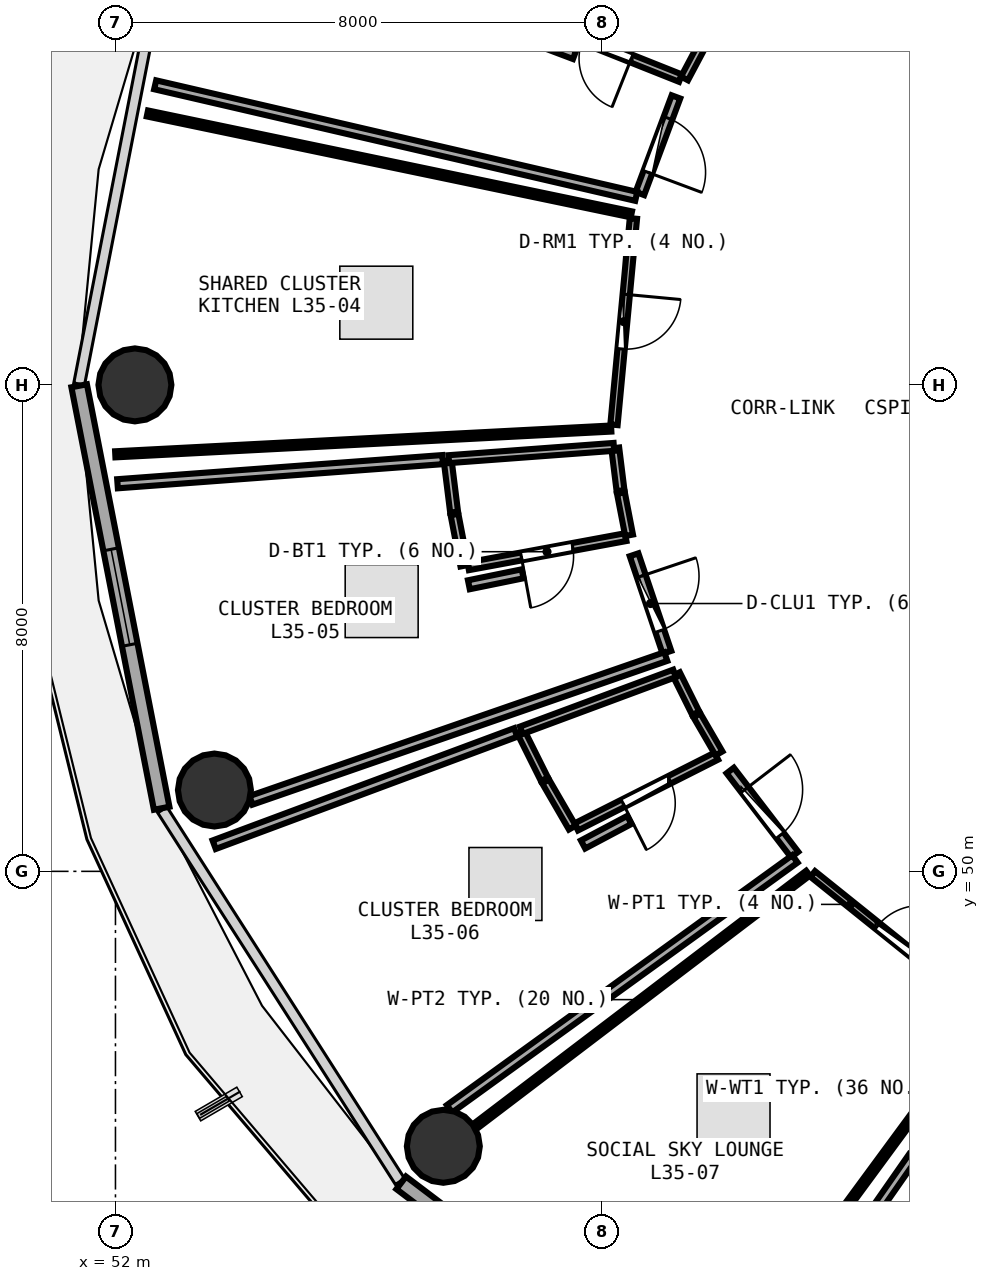
"""IFC4 building model, lengths in metres.
Left out: names, types, materials, properties, quantities, classifications, styles, units other than length and angle.
Written with IfcOpenShell. Run it as: python <this file> out.ifc"""

import sys

from ifc_helpers import new_model, si_unit, direction, frame, frame_2d, origin, origin_2d, place, context, subcontext, project, spatial, rectangle, circle, extrude, element, fill, save


model = new_model("IFC4")
c1 = context("Model", 3, precision=1e-05, world=origin(), true_north=direction((0.0, 1.0)))
c2 = subcontext(c1, "Body", "Model", "MODEL_VIEW")
j1 = project(units=[si_unit("LENGTHUNIT", "METRE"), si_unit("PLANEANGLEUNIT", "RADIAN")], contexts=[c1])
p1 = place(None, origin())
s1 = spatial("IfcSite", under=j1, at=p1, CompositionType="ELEMENT")
p2 = place(p1, origin())
s2 = spatial("IfcBuilding", under=s1, at=p2, CompositionType="ELEMENT")
p3 = place(p2, frame((0.0, 0.0, 139.35)))
s3 = spatial("IfcBuildingStorey", under=s2, at=p3, CompositionType="ELEMENT", Elevation=139.35)
for number, where, z_axis, x_axis in (
    (1, (52.32, 58.0, 0.0), (0.0, 0.0, 1.0), (1.0, 0.0, 0.0)),
    (2, (53.627, 51.337, 0.0), (0.0, 0.0, 1.0), (1.0, 0.0, 0.0)),
    (3, (57.392, 45.479, 0.0), (0.0, 0.0, 1.0), (1.0, 0.0, 0.0)),
):
    element("IfcColumn", number, at=place(p3, frame(where, z_axis=z_axis, x_axis=x_axis)), inside=s3, PredefinedType="COLUMN", context=c2, shape_type="SweptSolid", body=[
        extrude(circle(Radius=0.6, at=origin_2d()), origin(), (0.0, 0.0, 1.0), 3.75),
    ])
p4 = place(p3, frame((51.403, 57.985, 0.0), z_axis=(0.0, 0.0, 1.0), x_axis=(0.191716984769, -0.981450252306, 0.0)))
e4 = element("IfcWall", 4, at=p4, inside=s3, PredefinedType="SOLIDWALL", context=c2, shape_type="SweptSolid", body=[
    extrude(rectangle(XDim=7.079, YDim=0.26, at=frame_2d((3.54, 0.0))), origin(), (0.0, 0.0, 1.0), 3.475),
])
p5 = place(p4, frame((2.74, 0.0, 0.85)))
e5 = element("IfcOpeningElement", 5, at=p5, cuts=e4, PredefinedType="OPENING", context=c2, shape_type="SweptSolid", body=[
    extrude(rectangle(XDim=1.6, YDim=1.45, at=frame_2d((0.8, 0.725))), frame((0.0, 0.14, 0.0), z_axis=(0.0, -1.0, 0.0), x_axis=(1.0, 0.0, 0.0)), (0.0, 0.0, 1.0), 0.28),
])
p6 = place(p3, frame((56.699, 44.878, 0.0), z_axis=(0.0, 0.0, 1.0), x_axis=(0.797163719609, -0.603763202042, 0.0)))
e6 = element("IfcWall", 6, at=p6, inside=s3, PredefinedType="SOLIDWALL", context=c2, shape_type="SweptSolid", body=[
    extrude(rectangle(XDim=7.512, YDim=0.26, at=frame_2d((3.756, 0.0))), origin(), (0.0, 0.0, 1.0), 3.475),
])
p7 = place(p6, frame((2.956, 0.0, 0.85)))
e7 = element("IfcOpeningElement", 7, at=p7, cuts=e6, PredefinedType="OPENING", context=c2, shape_type="SweptSolid", body=[
    extrude(rectangle(XDim=1.6, YDim=1.45, at=frame_2d((0.8, 0.725))), frame((0.0, 0.14, 0.0), z_axis=(0.0, -1.0, 0.0), x_axis=(1.0, 0.0, 0.0)), (0.0, 0.0, 1.0), 0.28),
])
p8 = place(p3, frame((61.293, 63.044, 0.0), z_axis=(0.0, 0.0, 1.0), x_axis=(-0.929051463741, 0.369950507123, 0.0)))
e8 = element("IfcWall", 8, at=p8, inside=s3, PredefinedType="PLUMBINGWALL", context=c2, shape_type="SweptSolid", body=[
    extrude(rectangle(XDim=2.602, YDim=0.13, at=frame_2d((1.301, 0.0))), origin(), (0.0, 0.0, 1.0), 3.235),
])
p9 = place(p8, frame((0.871, 0.0, 0.0)))
e9 = element("IfcOpeningElement", 9, at=p9, cuts=e8, PredefinedType="OPENING", context=c2, shape_type="SweptSolid", body=[
    extrude(rectangle(XDim=0.86, YDim=2.05, at=frame_2d((0.43, 1.025))), frame((0.0, 0.075, 0.0), z_axis=(0.0, -1.0, 0.0), x_axis=(1.0, 0.0, 0.0)), (0.0, 0.0, 1.0), 0.15),
])
p10 = place(p3, frame((61.218, 62.736, 0.0), z_axis=(0.0, 0.0, 1.0), x_axis=(-0.349718783302, -0.93685472332, 0.0)))
e10 = element("IfcWall", 10, at=p10, inside=s3, PredefinedType="PARTITIONING", context=c2, shape_type="SweptSolid", body=[
    extrude(rectangle(XDim=1.696, YDim=0.15, at=frame_2d((0.848, 0.0))), origin(), (0.0, 0.0, 1.0), 3.235),
])
p11 = place(p10, frame((0.373, 0.0, 0.0)))
e11 = element("IfcOpeningElement", 11, at=p11, cuts=e10, PredefinedType="OPENING", context=c2, shape_type="SweptSolid", body=[
    extrude(rectangle(XDim=0.95, YDim=2.08, at=frame_2d((0.475, 1.04))), frame((0.0, 0.085, 0.0), z_axis=(0.0, -1.0, 0.0), x_axis=(1.0, 0.0, 0.0)), (0.0, 0.0, 1.0), 0.17),
])
p12 = place(p3, frame((60.518, 60.736, 0.0), z_axis=(0.0, 0.0, 1.0), x_axis=(-0.093855600535, -0.995585820634, 0.0)))
e12 = element("IfcWall", 12, at=p12, inside=s3, PredefinedType="PARTITIONING", context=c2, shape_type="SweptSolid", body=[
    extrude(rectangle(XDim=3.408, YDim=0.12, at=frame_2d((1.704, 0.0))), origin(), (0.0, 0.0, 1.0), 2.975),
])
p13 = place(p12, frame((1.254, 0.0, 0.0)))
e13 = element("IfcOpeningElement", 13, at=p13, cuts=e12, PredefinedType="OPENING", context=c2, shape_type="SweptSolid", body=[
    extrude(rectangle(XDim=0.9, YDim=2.08, at=frame_2d((0.45, 1.04))), frame((0.0, 0.07, 0.0), z_axis=(0.0, -1.0, 0.0), x_axis=(1.0, 0.0, 0.0)), (0.0, 0.0, 1.0), 0.14),
])
p14 = place(p3, frame((60.392, 55.496, 0.0), z_axis=(0.0, 0.0, 1.0), x_axis=(-0.983321304086, -0.181876916981, 0.0)))
e14 = element("IfcWall", 14, at=p14, inside=s3, PredefinedType="PLUMBINGWALL", context=c2, shape_type="SweptSolid", body=[
    extrude(rectangle(XDim=2.635, YDim=0.13, at=frame_2d((1.317, 0.0))), origin(), (0.0, 0.0, 1.0), 3.175),
])
p15 = place(p14, frame((0.887, 0.0, 0.0)))
e15 = element("IfcOpeningElement", 15, at=p15, cuts=e14, PredefinedType="OPENING", context=c2, shape_type="SweptSolid", body=[
    extrude(rectangle(XDim=0.86, YDim=2.05, at=frame_2d((0.43, 1.025))), frame((0.0, 0.075, 0.0), z_axis=(0.0, -1.0, 0.0), x_axis=(1.0, 0.0, 0.0)), (0.0, 0.0, 1.0), 0.15),
])
p16 = place(p3, frame((60.529, 55.206, 0.0), z_axis=(0.0, 0.0, 1.0), x_axis=(0.319297944841, -0.947654379202, 0.0)))
e16 = element("IfcWall", 16, at=p16, inside=s3, PredefinedType="PARTITIONING", context=c2, shape_type="SweptSolid", body=[
    extrude(rectangle(XDim=1.693, YDim=0.15, at=frame_2d((0.846, 0.0))), origin(), (0.0, 0.0, 1.0), 3.235),
])
p17 = place(p16, frame((0.371, 0.0, 0.0)))
e17 = element("IfcOpeningElement", 17, at=p17, cuts=e16, PredefinedType="OPENING", context=c2, shape_type="SweptSolid", body=[
    extrude(rectangle(XDim=0.95, YDim=2.08, at=frame_2d((0.475, 1.04))), frame((0.0, 0.085, 0.0), z_axis=(0.0, -1.0, 0.0), x_axis=(1.0, 0.0, 0.0)), (0.0, 0.0, 1.0), 0.17),
])
p18 = place(p3, frame((61.883, 51.895, 0.0), z_axis=(0.0, 0.0, 1.0), x_axis=(-0.892490597906, -0.451065995891, 0.0)))
e18 = element("IfcWall", 18, at=p18, inside=s3, PredefinedType="PLUMBINGWALL", context=c2, shape_type="SweptSolid", body=[
    extrude(rectangle(XDim=2.583, YDim=0.13, at=frame_2d((1.292, 0.0))), origin(), (0.0, 0.0, 1.0), 2.975),
])
p19 = place(p18, frame((0.861, 0.0, 0.0)))
e19 = element("IfcOpeningElement", 19, at=p19, cuts=e18, PredefinedType="OPENING", context=c2, shape_type="SweptSolid", body=[
    extrude(rectangle(XDim=0.86, YDim=2.05, at=frame_2d((0.43, 1.025))), frame((0.0, 0.075, 0.0), z_axis=(0.0, -1.0, 0.0), x_axis=(1.0, 0.0, 0.0)), (0.0, 0.0, 1.0), 0.15),
])
p20 = place(p3, frame((62.111, 51.658, 0.0), z_axis=(0.0, 0.0, 1.0), x_axis=(0.608307977949, -0.793701079729, 0.0)))
e20 = element("IfcWall", 20, at=p20, inside=s3, PredefinedType="PARTITIONING", context=c2, shape_type="SweptSolid", body=[
    extrude(rectangle(XDim=1.742, YDim=0.15, at=frame_2d((0.871, 0.0))), origin(), (0.0, 0.0, 1.0), 2.975),
])
p21 = place(p20, frame((0.396, 0.0, 0.0)))
e21 = element("IfcOpeningElement", 21, at=p21, cuts=e20, PredefinedType="OPENING", context=c2, shape_type="SweptSolid", body=[
    extrude(rectangle(XDim=0.95, YDim=2.08, at=frame_2d((0.475, 1.04))), frame((0.0, 0.085, 0.0), z_axis=(0.0, -1.0, 0.0), x_axis=(1.0, 0.0, 0.0)), (0.0, 0.0, 1.0), 0.17),
])
p22 = place(p3, frame((63.468, 49.957, 0.0), z_axis=(0.0, 0.0, 1.0), x_axis=(0.78006790059, -0.625694870099, 0.0)))
e22 = element("IfcWall", 22, at=p22, inside=s3, PredefinedType="PARTITIONING", context=c2, shape_type="SweptSolid", body=[
    extrude(rectangle(XDim=3.631, YDim=0.12, at=frame_2d((1.815, 0.0))), origin(), (0.0, 0.0, 1.0), 2.975),
])
p23 = place(p22, frame((1.366, 0.0, 0.0)))
e23 = element("IfcOpeningElement", 23, at=p23, cuts=e22, PredefinedType="OPENING", context=c2, shape_type="SweptSolid", body=[
    extrude(rectangle(XDim=0.9, YDim=2.08, at=frame_2d((0.45, 1.04))), frame((0.0, 0.07, 0.0), z_axis=(0.0, -1.0, 0.0), x_axis=(1.0, 0.0, 0.0)), (0.0, 0.0, 1.0), 0.14),
])
p24 = place(p3, frame((61.697, 63.676, 0.0), z_axis=(0.0, 0.0, 1.0), x_axis=(-0.469163481751, -0.88311133352, 0.0)))
e24 = element("IfcWall", 24, at=p24, inside=s3, PredefinedType="PLUMBINGWALL", context=c2, shape_type="SweptSolid", body=[
    extrude(rectangle(XDim=0.721, YDim=0.13, at=frame_2d((0.36, 0.0))), origin(), (0.0, 0.0, 1.0), 3.48),
])
p25 = place(p3, frame((60.565, 61.1, 0.0), z_axis=(0.0, 0.0, 1.0), x_axis=(-0.97414388338, 0.225928516292, 0.0)))
e25 = element("IfcWall", 25, at=p25, inside=s3, PredefinedType="PARTITIONING", context=c2, shape_type="SweptSolid", body=[
    extrude(rectangle(XDim=8.122, YDim=0.15, at=frame_2d((4.061, 0.0))), origin(), (0.0, 0.0, 1.0), 3.025),
])
p26 = place(p3, frame((58.688, 63.755, 0.0), z_axis=(0.0, 0.0, 1.0), x_axis=(0.935532386314, -0.353240929336, 0.0)))
e26 = element("IfcWall", 26, at=p26, inside=s3, PredefinedType="PARTITIONING", context=c2, shape_type="SweptSolid", body=[
    extrude(rectangle(XDim=0.922, YDim=0.15, at=frame_2d((0.461, 0.0))), origin(), (0.0, 0.0, 1.0), 3.48),
])
p27 = place(p3, frame((60.153, 57.282, 0.0), z_axis=(0.0, 0.0, 1.0), x_axis=(-0.998652620107, -0.051893586821, 0.0)))
e27 = element("IfcWall", 27, at=p27, inside=s3, PredefinedType="PARTITIONING", context=c2, shape_type="SweptSolid", body=[
    extrude(rectangle(XDim=8.167, YDim=0.1, at=frame_2d((4.083, 0.0))), origin(), (0.0, 0.0, 1.0), 3.025),
])
p28 = place(p3, frame((52.525, 62.464, 0.0), z_axis=(0.0, 0.0, 1.0), x_axis=(0.978946183013, -0.204118521367, 0.0)))
e28 = element("IfcWall", 28, at=p28, inside=s3, PredefinedType="PARTITIONING", context=c2, shape_type="SweptSolid", body=[
    extrude(rectangle(XDim=8.131, YDim=0.1, at=frame_2d((4.065, 0.0))), origin(), (0.0, 0.0, 1.0), 3.025),
])
p29 = place(p3, frame((60.219, 56.962, 0.0), z_axis=(0.0, 0.0, 1.0), x_axis=(0.12297181285, -0.992410163816, 0.0)))
e29 = element("IfcWall", 29, at=p29, inside=s3, PredefinedType="PLUMBINGWALL", context=c2, shape_type="SweptSolid", body=[
    extrude(rectangle(XDim=0.707, YDim=0.13, at=frame_2d((0.354, 0.0))), origin(), (0.0, 0.0, 1.0), 3.48),
])
p30 = place(p3, frame((60.313, 56.221, 0.0), z_axis=(0.0, 0.0, 1.0), x_axis=(0.190075536698, -0.981769469045, 0.0)))
e30 = element("IfcWall", 30, at=p30, inside=s3, PredefinedType="PLUMBINGWALL", context=c2, shape_type="SweptSolid", body=[
    extrude(rectangle(XDim=0.708, YDim=0.13, at=frame_2d((0.354, 0.0))), origin(), (0.0, 0.0, 1.0), 3.48),
])
p31 = place(p3, frame((57.738, 55.026, 0.0), z_axis=(0.0, 0.0, 1.0), x_axis=(-0.189438154161, 0.981892654901, 0.0)))
e31 = element("IfcWall", 31, at=p31, inside=s3, PredefinedType="PLUMBINGWALL", context=c2, shape_type="SweptSolid", body=[
    extrude(rectangle(XDim=0.858, YDim=0.13, at=frame_2d((0.429, 0.0))), origin(), (0.0, 0.0, 1.0), 3.48),
])
p32 = place(p3, frame((57.57, 55.908, 0.0), z_axis=(0.0, 0.0, 1.0), x_axis=(-0.124069838268, 0.992273488123, 0.0)))
e32 = element("IfcWall", 32, at=p32, inside=s3, PredefinedType="PLUMBINGWALL", context=c2, shape_type="SweptSolid", body=[
    extrude(rectangle(XDim=0.856, YDim=0.13, at=frame_2d((0.428, 0.0))), origin(), (0.0, 0.0, 1.0), 3.48),
])
p33 = place(p3, frame((57.481, 56.779, 0.0), z_axis=(0.0, 0.0, 1.0), x_axis=(0.997248398148, 0.074132532608, 0.0)))
e33 = element("IfcWall", 33, at=p33, inside=s3, PredefinedType="PLUMBINGWALL", context=c2, shape_type="SweptSolid", body=[
    extrude(rectangle(XDim=2.724, YDim=0.13, at=frame_2d((1.362, 0.0))), origin(), (0.0, 0.0, 1.0), 3.175),
])
p34 = place(p3, frame((61.051, 53.532, 0.0), z_axis=(0.0, 0.0, 1.0), x_axis=(-0.944870237137, -0.327445010608, 0.0)))
e34 = element("IfcWall", 34, at=p34, inside=s3, PredefinedType="PARTITIONING", context=c2, shape_type="SweptSolid", body=[
    extrude(rectangle(XDim=7.22, YDim=0.15, at=frame_2d((3.61, 0.0))), origin(), (0.0, 0.0, 1.0), 2.975),
])
p35 = place(p3, frame((52.034, 56.374, 0.0), z_axis=(0.0, 0.0, 1.0), x_axis=(0.997255565749, 0.074036049215, 0.0)))
e35 = element("IfcWall", 35, at=p35, inside=s3, PredefinedType="PARTITIONING", context=c2, shape_type="SweptSolid", body=[
    extrude(rectangle(XDim=5.362, YDim=0.15, at=frame_2d((2.681, 0.0))), origin(), (0.0, 0.0, 1.0), 3.025),
])
p36 = place(p3, frame((57.812, 54.713, 0.0), z_axis=(0.0, 0.0, 1.0), x_axis=(0.979802976843, 0.199965313418, 0.0)))
e36 = element("IfcWall", 36, at=p36, inside=s3, PredefinedType="PARTITIONING", context=c2, shape_type="SweptSolid", body=[
    extrude(rectangle(XDim=0.902, YDim=0.15, at=frame_2d((0.451, 0.0))), origin(), (0.0, 0.0, 1.0), 3.175),
])
p37 = place(p3, frame((61.223, 53.245, 0.0), z_axis=(0.0, 0.0, 1.0), x_axis=(0.445176568549, -0.895442808232, 0.0)))
e37 = element("IfcWall", 37, at=p37, inside=s3, PredefinedType="PLUMBINGWALL", context=c2, shape_type="SweptSolid", body=[
    extrude(rectangle(XDim=0.719, YDim=0.13, at=frame_2d((0.36, 0.0))), origin(), (0.0, 0.0, 1.0), 3.235),
])
p38 = place(p3, frame((61.562, 52.566, 0.0), z_axis=(0.0, 0.0, 1.0), x_axis=(0.502403748171, -0.864633144069, 0.0)))
e38 = element("IfcWall", 38, at=p38, inside=s3, PredefinedType="PLUMBINGWALL", context=c2, shape_type="SweptSolid", body=[
    extrude(rectangle(XDim=0.725, YDim=0.13, at=frame_2d((0.362, 0.0))), origin(), (0.0, 0.0, 1.0), 3.48),
])
p39 = place(p3, frame((59.514, 50.72, 0.0), z_axis=(0.0, 0.0, 1.0), x_axis=(-0.501222652689, 0.865318353227, 0.0)))
e39 = element("IfcWall", 39, at=p39, inside=s3, PredefinedType="PLUMBINGWALL", context=c2, shape_type="SweptSolid", body=[
    extrude(rectangle(XDim=0.878, YDim=0.13, at=frame_2d((0.439, 0.0))), origin(), (0.0, 0.0, 1.0), 2.975),
])
p40 = place(p3, frame((59.055, 51.515, 0.0), z_axis=(0.0, 0.0, 1.0), x_axis=(-0.446317376376, 0.894874739584, 0.0)))
e40 = element("IfcWall", 40, at=p40, inside=s3, PredefinedType="PLUMBINGWALL", context=c2, shape_type="SweptSolid", body=[
    extrude(rectangle(XDim=0.872, YDim=0.13, at=frame_2d((0.436, 0.0))), origin(), (0.0, 0.0, 1.0), 3.48),
])
p41 = place(p3, frame((58.676, 52.32, 0.0), z_axis=(0.0, 0.0, 1.0), x_axis=(0.937399857035, 0.348254946887, 0.0)))
e41 = element("IfcWall", 41, at=p41, inside=s3, PredefinedType="PLUMBINGWALL", context=c2, shape_type="SweptSolid", body=[
    extrude(rectangle(XDim=2.688, YDim=0.13, at=frame_2d((1.344, 0.0))), origin(), (0.0, 0.0, 1.0), 3.235),
])
p42 = place(p3, frame((63.175, 50.205, 0.0), z_axis=(0.0, 0.0, 1.0), x_axis=(-0.810227225477, -0.586115895618, 0.0)))
e42 = element("IfcWall", 42, at=p42, inside=s3, PredefinedType="PARTITIONING", context=c2, shape_type="SweptSolid", body=[
    extrude(rectangle(XDim=7.011, YDim=0.15, at=frame_2d((3.506, 0.0))), origin(), (0.0, 0.0, 1.0), 3.175),
])
p43 = place(p3, frame((53.624, 50.438, 0.0), z_axis=(0.0, 0.0, 1.0), x_axis=(0.937175901168, 0.348857177468, 0.0)))
e43 = element("IfcWall", 43, at=p43, inside=s3, PredefinedType="PARTITIONING", context=c2, shape_type="SweptSolid", body=[
    extrude(rectangle(XDim=5.292, YDim=0.15, at=frame_2d((2.646, 0.0))), origin(), (0.0, 0.0, 1.0), 2.975),
])
p44 = place(p3, frame((59.69, 50.442, 0.0), z_axis=(0.0, 0.0, 1.0), x_axis=(0.883456769574, 0.468512685308, 0.0)))
e44 = element("IfcWall", 44, at=p44, inside=s3, PredefinedType="PARTITIONING", context=c2, shape_type="SweptSolid", body=[
    extrude(rectangle(XDim=0.861, YDim=0.15, at=frame_2d((0.431, 0.0))), origin(), (0.0, 0.0, 1.0), 3.48),
])
p45 = place(p3, frame((66.323, 47.615, 0.0), z_axis=(0.0, 0.0, 1.0), x_axis=(-0.592678959784, -0.805438793845, 0.0)))
e45 = element("IfcWall", 45, at=p45, inside=s3, PredefinedType="PARTITIONING", context=c2, shape_type="SweptSolid", body=[
    extrude(rectangle(XDim=7.624, YDim=0.1, at=frame_2d((3.812, 0.0))), origin(), (0.0, 0.0, 1.0), 2.975),
])
p46 = place(p3, frame((57.921, 45.811, 0.0), z_axis=(0.0, 0.0, 1.0), x_axis=(0.79595600815, 0.60535446896, 0.0)))
e46 = element("IfcWall", 46, at=p46, inside=s3, PredefinedType="PARTITIONING", context=c2, shape_type="SweptSolid", body=[
    extrude(rectangle(XDim=6.869, YDim=0.1, at=frame_2d((3.435, 0.0))), origin(), (0.0, 0.0, 1.0), 2.975),
])
p47 = place(p3, frame((62.257, 41.211, 0.0), z_axis=(0.0, 0.0, 1.0), x_axis=(0.572125752908, 0.820165911789, 0.0)))
e47 = element("IfcWall", 47, at=p47, inside=s3, PredefinedType="PARTITIONING", context=c2, shape_type="SweptSolid", body=[
    extrude(rectangle(XDim=4.992, YDim=0.15, at=frame_2d((2.496, 0.0))), origin(), (0.0, 0.0, 1.0), 2.975),
])
p48 = place(p5, origin())
e48 = element("IfcWindow", 48, at=p48, inside=s3, PartitioningType="SINGLE_PANEL", PredefinedType="WINDOW", context=c2, shape_type="SweptSolid", body=[
    extrude(rectangle(XDim=1.6, YDim=1.45, at=frame_2d((0.8, 0.725))), frame((0.0, 0.03, 0.0), z_axis=(0.0, -1.0, 0.0), x_axis=(1.0, 0.0, 0.0)), (0.0, 0.0, 1.0), 0.06),
])
fill(e5, e48)
p49 = place(p9, origin())
e49 = element("IfcDoor", 49, at=p49, inside=s3, OperationType="SINGLE_SWING_LEFT", PredefinedType="DOOR", context=c2, shape_type="SweptSolid", body=[
    extrude(rectangle(XDim=0.86, YDim=2.05, at=frame_2d((0.43, 1.025))), frame((0.0, 0.025, 0.0), z_axis=(0.0, -1.0, 0.0), x_axis=(1.0, 0.0, 0.0)), (0.0, 0.0, 1.0), 0.05),
])
fill(e9, e49)
p50 = place(p11, origin())
e50 = element("IfcDoor", 50, at=p50, inside=s3, OperationType="SINGLE_SWING_RIGHT", PredefinedType="DOOR", context=c2, shape_type="SweptSolid", body=[
    extrude(rectangle(XDim=0.95, YDim=2.08, at=frame_2d((0.475, 1.04))), frame((0.0, 0.025, 0.0), z_axis=(0.0, -1.0, 0.0), x_axis=(1.0, 0.0, 0.0)), (0.0, 0.0, 1.0), 0.05),
])
fill(e11, e50)
p51 = place(p13, origin())
e51 = element("IfcDoor", 51, at=p51, inside=s3, OperationType="SINGLE_SWING_LEFT", PredefinedType="DOOR", context=c2, shape_type="SweptSolid", body=[
    extrude(rectangle(XDim=0.9, YDim=2.08, at=frame_2d((0.45, 1.04))), frame((0.0, 0.025, 0.0), z_axis=(0.0, -1.0, 0.0), x_axis=(1.0, 0.0, 0.0)), (0.0, 0.0, 1.0), 0.05),
])
fill(e13, e51)
p52 = place(p15, origin())
e52 = element("IfcDoor", 52, at=p52, inside=s3, OperationType="SINGLE_SWING_RIGHT", PredefinedType="DOOR", context=c2, shape_type="SweptSolid", body=[
    extrude(rectangle(XDim=0.86, YDim=2.05, at=frame_2d((0.43, 1.025))), frame((0.0, 0.025, 0.0), z_axis=(0.0, -1.0, 0.0), x_axis=(1.0, 0.0, 0.0)), (0.0, 0.0, 1.0), 0.05),
])
fill(e15, e52)
p53 = place(p17, origin())
e53 = element("IfcDoor", 53, at=p53, inside=s3, OperationType="SINGLE_SWING_LEFT", PredefinedType="DOOR", context=c2, shape_type="SweptSolid", body=[
    extrude(rectangle(XDim=0.95, YDim=2.08, at=frame_2d((0.475, 1.04))), frame((0.0, 0.025, 0.0), z_axis=(0.0, -1.0, 0.0), x_axis=(1.0, 0.0, 0.0)), (0.0, 0.0, 1.0), 0.05),
])
fill(e17, e53)
p54 = place(p19, origin())
e54 = element("IfcDoor", 54, at=p54, inside=s3, OperationType="SINGLE_SWING_RIGHT", PredefinedType="DOOR", context=c2, shape_type="SweptSolid", body=[
    extrude(rectangle(XDim=0.86, YDim=2.05, at=frame_2d((0.43, 1.025))), frame((0.0, 0.025, 0.0), z_axis=(0.0, -1.0, 0.0), x_axis=(1.0, 0.0, 0.0)), (0.0, 0.0, 1.0), 0.05),
])
fill(e19, e54)
p55 = place(p21, origin())
e55 = element("IfcDoor", 55, at=p55, inside=s3, OperationType="SINGLE_SWING_LEFT", PredefinedType="DOOR", context=c2, shape_type="SweptSolid", body=[
    extrude(rectangle(XDim=0.95, YDim=2.08, at=frame_2d((0.475, 1.04))), frame((0.0, 0.025, 0.0), z_axis=(0.0, -1.0, 0.0), x_axis=(1.0, 0.0, 0.0)), (0.0, 0.0, 1.0), 0.05),
])
fill(e21, e55)
p56 = place(p23, origin())
e56 = element("IfcDoor", 56, at=p56, inside=s3, OperationType="SINGLE_SWING_RIGHT", PredefinedType="DOOR", context=c2, shape_type="SweptSolid", body=[
    extrude(rectangle(XDim=0.9, YDim=2.08, at=frame_2d((0.45, 1.04))), frame((0.0, 0.025, 0.0), z_axis=(0.0, -1.0, 0.0), x_axis=(1.0, 0.0, 0.0)), (0.0, 0.0, 1.0), 0.05),
])
fill(e23, e56)
save(model, sys.argv[1])
